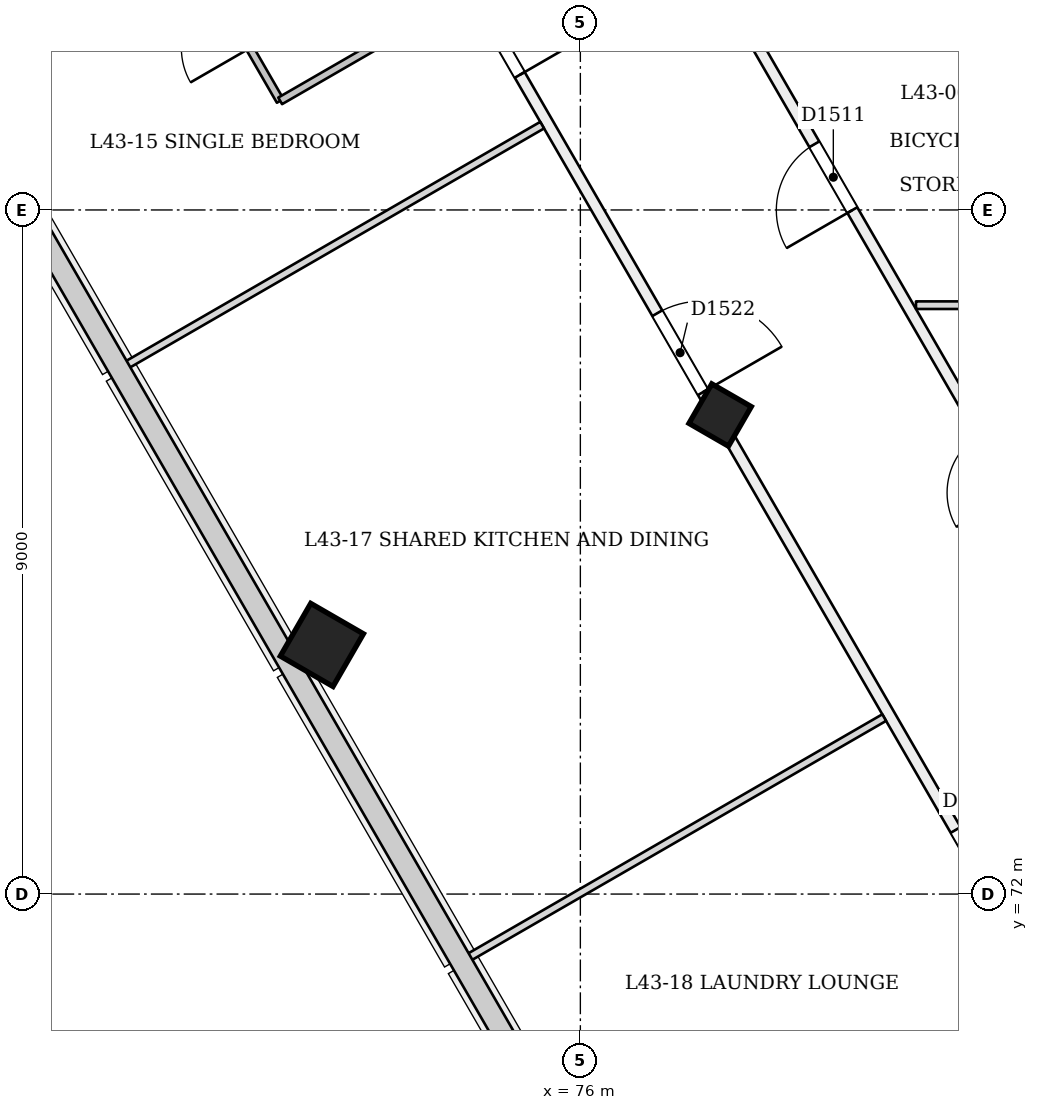
"""IFC4 building model, lengths in metres.
Left out: names, types, materials, properties, quantities, classifications, styles, units other than length and angle.
Written with IfcOpenShell. Run it as: python <this file> out.ifc"""

import sys

from ifc_helpers import new_model, si_unit, direction, frame, frame_2d, origin, origin_2d, place, context, subcontext, project, spatial, rectangle, extrude, element, fill, save


model = new_model("IFC4")
c1 = context("Model", 3, precision=1e-05, world=origin(), true_north=direction((0.0, 1.0)))
c2 = subcontext(c1, "Body", "Model", "MODEL_VIEW")
j1 = project(units=[si_unit("LENGTHUNIT", "METRE"), si_unit("PLANEANGLEUNIT", "RADIAN")], contexts=[c1])
p1 = place(None, origin())
s1 = spatial("IfcSite", under=j1, at=p1, CompositionType="ELEMENT")
p2 = place(p1, origin())
s2 = spatial("IfcBuilding", under=s1, at=p2, CompositionType="ELEMENT")
p3 = place(p2, frame((0.0, 0.0, 167.4)))
s3 = spatial("IfcBuildingStorey", under=s2, at=p3, CompositionType="ELEMENT", Elevation=167.4)
p4 = place(p3, frame((77.812, 78.255, -0.018), z_axis=(0.022222852987, 0.038483477124, 0.999012095419), x_axis=(-0.865639352107, -0.499186721818, 0.038485436791)))
e1 = element("IfcColumn", 1, at=p4, inside=s3, PredefinedType="COLUMN", context=c2, shape_type="SweptSolid", body=[
    extrude(rectangle(XDim=0.6, YDim=0.6, at=origin_2d()), origin(), (0.0, 0.0, 1.0), 3.604),
])
p5 = place(p3, frame((72.572, 75.23, -0.024), z_axis=(0.02222134892, 0.038480872521, 0.999012229206), x_axis=(-0.865639410047, -0.499186822153, 0.038482832055)))
e2 = element("IfcColumn", 2, at=p5, inside=s3, PredefinedType="COLUMN", context=c2, shape_type="SweptSolid", body=[
    extrude(rectangle(XDim=0.8, YDim=0.8, at=origin_2d()), origin(), (0.0, 0.0, 1.0), 3.604),
])
p6 = place(p3, frame((85.0, 71.607, 0.0), z_axis=(0.0, 0.0, 1.0), x_axis=(-0.50000134921, 0.866024624816, 0.0)))
e3 = element("IfcWall", 3, at=p6, inside=s3, PredefinedType="PARTITIONING", context=c2, shape_type="SweptSolid", body=[
    extrude(rectangle(XDim=21.47, YDim=0.15, at=frame_2d((10.735, 0.0))), origin(), (0.0, 0.0, 1.0), 3.15),
])
p7 = place(p6, frame((6.551, 0.0, 0.0)))
e4 = element("IfcOpeningElement", 4, at=p7, cuts=e3, PredefinedType="OPENING", context=c2, shape_type="SweptSolid", body=[
    extrude(rectangle(XDim=0.9, YDim=2.1, at=frame_2d((0.45, 1.05))), frame((0.0, 0.085, 0.0), z_axis=(0.0, -1.0, 0.0), x_axis=(1.0, 0.0, 0.0)), (0.0, 0.0, 1.0), 0.171),
])
p8 = place(p6, frame((17.775, 0.0, 0.0)))
e5 = element("IfcOpeningElement", 5, at=p8, cuts=e3, PredefinedType="OPENING", context=c2, shape_type="SweptSolid", body=[
    extrude(rectangle(XDim=1.0, YDim=2.1, at=frame_2d((0.5, 1.05))), frame((0.0, 0.085, 0.0), z_axis=(0.0, -1.0, 0.0), x_axis=(1.0, 0.0, 0.0)), (0.0, 0.0, 1.0), 0.171),
])
p9 = place(p6, frame((2.636, 0.0, 0.0)))
e6 = element("IfcOpeningElement", 6, at=p9, cuts=e3, PredefinedType="OPENING", context=c2, shape_type="SweptSolid", body=[
    extrude(rectangle(XDim=1.0, YDim=2.1, at=frame_2d((0.5, 1.05))), frame((0.0, 0.085, 0.0), z_axis=(0.0, -1.0, 0.0), x_axis=(1.0, 0.0, 0.0)), (0.0, 0.0, 1.0), 0.171),
])
p10 = place(p6, frame((10.844, 0.0, 0.0)))
e7 = element("IfcOpeningElement", 7, at=p10, cuts=e3, PredefinedType="OPENING", context=c2, shape_type="SweptSolid", body=[
    extrude(rectangle(XDim=1.0, YDim=2.1, at=frame_2d((0.5, 1.05))), frame((0.0, 0.085, 0.0), z_axis=(0.0, -1.0, 0.0), x_axis=(1.0, 0.0, 0.0)), (0.0, 0.0, 1.0), 0.171),
])
p11 = place(p3, frame((71.062, 89.948, 0.0), z_axis=(0.0, 0.0, 1.0), x_axis=(0.500000184135, -0.866025297474, 0.0)))
e8 = element("IfcWall", 8, at=p11, inside=s3, PredefinedType="PARTITIONING", context=c2, shape_type="SweptSolid", body=[
    extrude(rectangle(XDim=27.875, YDim=0.15, at=frame_2d((13.938, 0.0))), origin(), (0.0, 0.0, 1.0), 2.75),
])
p12 = place(p11, frame((0.72, 0.0, 0.0)))
e9 = element("IfcOpeningElement", 9, at=p12, cuts=e8, PredefinedType="OPENING", context=c2, shape_type="SweptSolid", body=[
    extrude(rectangle(XDim=1.0, YDim=2.1, at=frame_2d((0.5, 1.05))), frame((0.0, 0.085, 0.0), z_axis=(0.0, -1.0, 0.0), x_axis=(1.0, 0.0, 0.0)), (0.0, 0.0, 1.0), 0.171),
])
p13 = place(p11, frame((7.28, 0.0, 0.0)))
e10 = element("IfcOpeningElement", 10, at=p13, cuts=e8, PredefinedType="OPENING", context=c2, shape_type="SweptSolid", body=[
    extrude(rectangle(XDim=1.0, YDim=2.1, at=frame_2d((0.5, 1.05))), frame((0.0, 0.085, 0.0), z_axis=(0.0, -1.0, 0.0), x_axis=(1.0, 0.0, 0.0)), (0.0, 0.0, 1.0), 0.171),
])
p14 = place(p11, frame((11.9, 0.0, 0.0)))
e11 = element("IfcOpeningElement", 11, at=p14, cuts=e8, PredefinedType="OPENING", context=c2, shape_type="SweptSolid", body=[
    extrude(rectangle(XDim=1.2, YDim=2.1, at=frame_2d((0.6, 1.05))), frame((0.0, 0.085, 0.0), z_axis=(0.0, -1.0, 0.0), x_axis=(1.0, 0.0, 0.0)), (0.0, 0.0, 1.0), 0.171),
])
p15 = place(p11, frame((19.75, 0.0, 0.0)))
e12 = element("IfcOpeningElement", 12, at=p15, cuts=e8, PredefinedType="OPENING", context=c2, shape_type="SweptSolid", body=[
    extrude(rectangle(XDim=1.0, YDim=2.1, at=frame_2d((0.5, 1.05))), frame((0.0, 0.085, 0.0), z_axis=(0.0, -1.0, 0.0), x_axis=(1.0, 0.0, 0.0)), (0.0, 0.0, 1.0), 0.171),
])
p16 = place(p11, frame((26.051, 0.0, 0.0)))
e13 = element("IfcOpeningElement", 13, at=p16, cuts=e8, PredefinedType="OPENING", context=c2, shape_type="SweptSolid", body=[
    extrude(rectangle(XDim=1.2, YDim=2.1, at=frame_2d((0.6, 1.05))), frame((0.0, 0.085, 0.0), z_axis=(0.0, -1.0, 0.0), x_axis=(1.0, 0.0, 0.0)), (0.0, 0.0, 1.0), 0.171),
])
p17 = place(p3, frame((87.515, 79.747, 0.0), z_axis=(0.0, 0.0, 1.0), x_axis=(-1.0, 0.0, 0.0)))
e14 = element("IfcWall", 14, at=p17, inside=s3, PredefinedType="PARTITIONING", context=c2, shape_type="SweptSolid", body=[
    extrude(rectangle(XDim=7.1, YDim=0.1, at=frame_2d((3.55, 0.0))), origin(), (0.0, 0.0, 1.0), 3.15),
])
p18 = place(p3, frame((72.051, 82.435, 0.0), z_axis=(0.0, 0.0, 1.0), x_axis=(-0.500004234368, 0.866022959057, 0.0)))
e15 = element("IfcWall", 15, at=p18, inside=s3, PredefinedType="PARTITIONING", context=c2, shape_type="SweptSolid", body=[
    extrude(rectangle(XDim=5.0, YDim=0.1, at=frame_2d((2.5, 0.0))), origin(), (0.0, 0.0, 1.0), 2.75),
])
p19 = place(p18, frame((3.3, 0.0, 0.0)))
e16 = element("IfcOpeningElement", 16, at=p19, cuts=e15, PredefinedType="OPENING", context=c2, shape_type="SweptSolid", body=[
    extrude(rectangle(XDim=0.9, YDim=2.1, at=frame_2d((0.45, 1.05))), frame((0.0, 0.061, 0.0), z_axis=(0.0, -1.0, 0.0), x_axis=(1.0, 0.0, 0.0)), (0.0, 0.0, 1.0), 0.121),
])
p20 = place(p18, frame((0.8, 0.0, 0.0)))
e17 = element("IfcOpeningElement", 17, at=p20, cuts=e15, PredefinedType="OPENING", context=c2, shape_type="SweptSolid", body=[
    extrude(rectangle(XDim=0.9, YDim=2.1, at=frame_2d((0.45, 1.05))), frame((0.0, 0.061, 0.0), z_axis=(0.0, -1.0, 0.0), x_axis=(1.0, 0.0, 0.0)), (0.0, 0.0, 1.0), 0.121),
])
p21 = place(p3, frame((67.77, 82.85, 0.0), z_axis=(0.0, 0.0, 1.0), x_axis=(0.866013532718, 0.500020560727, 0.0)))
e18 = element("IfcWall", 18, at=p21, inside=s3, PredefinedType="PARTITIONING", context=c2, shape_type="SweptSolid", body=[
    extrude(rectangle(XDim=3.45, YDim=0.15, at=frame_2d((1.725, 0.0))), origin(), (0.0, 0.0, 1.0), 2.65),
])
p22 = place(p3, frame((74.497, 83.848, 0.0), z_axis=(0.0, 0.0, 1.0), x_axis=(-0.866011447264, -0.500024172624, 0.0)))
e19 = element("IfcWall", 19, at=p22, inside=s3, PredefinedType="PARTITIONING", context=c2, shape_type="SweptSolid", body=[
    extrude(rectangle(XDim=2.825, YDim=0.1, at=frame_2d((1.413, 0.0))), origin(), (0.0, 0.0, 1.0), 3.15),
])
for number, where, z_axis, x_axis in (
    (20, (70.002, 78.943, 0.0), (0.0, 0.0, 1.0), (0.866, 0.5, 0.0)),
    (21, (74.502, 71.149, 0.0), (0.0, 0.0, 1.0), (0.866, 0.5, 0.0)),
):
    element("IfcWall", number, at=place(p3, frame(where, z_axis=z_axis, x_axis=x_axis)), inside=s3, PredefinedType="PARTITIONING", context=c2, shape_type="SweptSolid", body=[
        extrude(rectangle(XDim=6.345, YDim=0.1, at=frame_2d((3.173, 0.0))), origin(), (0.0, 0.0, 1.0), 2.65),
    ])
p23 = place(p3, frame((76.77, 67.262, 0.0), z_axis=(0.0, 0.0, 1.0), x_axis=(0.866015887322, 0.500016482634, 0.0)))
e22 = element("IfcWall", 22, at=p23, inside=s3, PredefinedType="PARTITIONING", context=c2, shape_type="SweptSolid", body=[
    extrude(rectangle(XDim=6.325, YDim=0.1, at=frame_2d((3.163, 0.0))), origin(), (0.0, 0.0, 1.0), 2.65),
])
p24 = place(p10, origin())
e23 = element("IfcDoor", 23, at=p24, inside=s3, OperationType="SINGLE_SWING_LEFT", PredefinedType="NOTDEFINED", context=c2, shape_type="SweptSolid", body=[
    extrude(rectangle(XDim=1.0, YDim=2.1, at=frame_2d((0.5, 1.05))), frame((0.0, 0.025, 0.0), z_axis=(0.0, -1.0, 0.0), x_axis=(1.0, 0.0, 0.0)), (0.0, 0.0, 1.0), 0.05),
])
fill(e7, e23)
p25 = place(p13, origin())
e24 = element("IfcDoor", 24, at=p25, inside=s3, OperationType="SINGLE_SWING_RIGHT", PredefinedType="NOTDEFINED", context=c2, shape_type="SweptSolid", body=[
    extrude(rectangle(XDim=1.0, YDim=2.1, at=frame_2d((0.5, 1.05))), frame((0.0, 0.025, 0.0), z_axis=(0.0, -1.0, 0.0), x_axis=(1.0, 0.0, 0.0)), (0.0, 0.0, 1.0), 0.05),
])
fill(e10, e24)
p26 = place(p14, origin())
e25 = element("IfcDoor", 25, at=p26, inside=s3, OperationType="SINGLE_SWING_RIGHT", PredefinedType="NOTDEFINED", context=c2, shape_type="SweptSolid", body=[
    extrude(rectangle(XDim=1.2, YDim=2.1, at=frame_2d((0.6, 1.05))), frame((0.0, 0.025, 0.0), z_axis=(0.0, -1.0, 0.0), x_axis=(1.0, 0.0, 0.0)), (0.0, 0.0, 1.0), 0.05),
])
fill(e11, e25)
p27 = place(p15, origin())
e26 = element("IfcDoor", 26, at=p27, inside=s3, OperationType="SINGLE_SWING_RIGHT", PredefinedType="NOTDEFINED", context=c2, shape_type="SweptSolid", body=[
    extrude(rectangle(XDim=1.0, YDim=2.1, at=frame_2d((0.5, 1.05))), frame((0.0, 0.025, 0.0), z_axis=(0.0, -1.0, 0.0), x_axis=(1.0, 0.0, 0.0)), (0.0, 0.0, 1.0), 0.05),
])
fill(e12, e26)
save(model, sys.argv[1])
